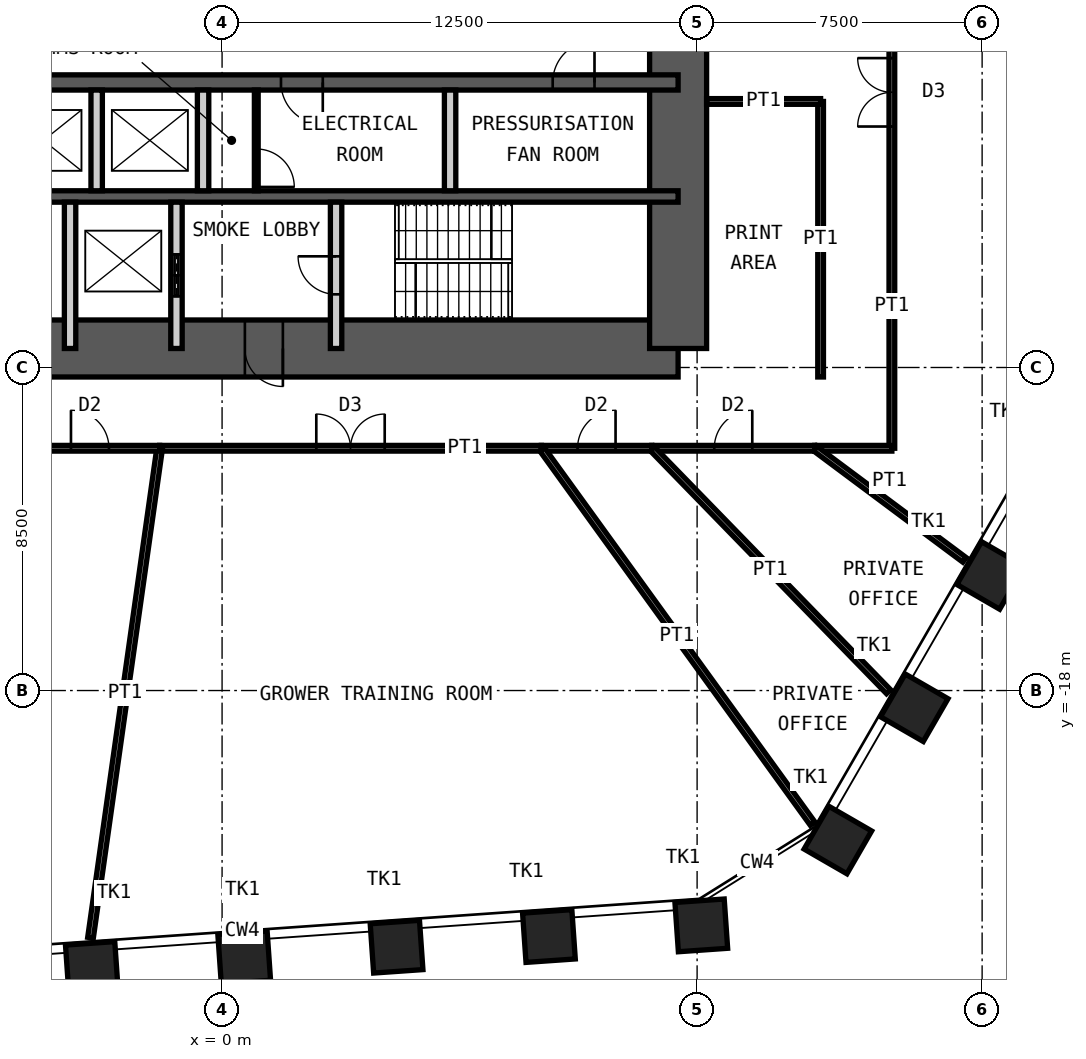
"""IFC4 building model, lengths in metres.
Left out: names, types, materials, properties, quantities, classifications, styles, units other than length and angle.
Written with IfcOpenShell. Run it as: python <this file> out.ifc"""

import sys

from ifc_helpers import new_model, si_unit, direction, frame, frame_2d, origin, origin_2d, place, context, subcontext, project, spatial, rectangle, hollow_rectangle, extrude, element, fill, save


model = new_model("IFC4")
c1 = context("Model", 3, precision=1e-05, world=origin(), true_north=direction((0.0, 1.0)))
c2 = subcontext(c1, "Body", "Model", "MODEL_VIEW")
j1 = project(units=[si_unit("LENGTHUNIT", "METRE"), si_unit("PLANEANGLEUNIT", "RADIAN")], contexts=[c1])
p1 = place(None, origin())
s1 = spatial("IfcSite", under=j1, at=p1, CompositionType="ELEMENT")
p2 = place(p1, origin())
s2 = spatial("IfcBuilding", under=s1, at=p2, CompositionType="ELEMENT")
p3 = place(p2, frame((0.0, 0.0, 170.2)))
s3 = spatial("IfcBuildingStorey", under=s2, at=p3, CompositionType="ELEMENT", Elevation=170.2)
for number, where, z_axis, x_axis in (
    (1, (20.223, -14.972, 0.0), (0.0, 0.0, 1.0), (0.5, 0.866, 0.0)),
    (2, (18.214, -18.453, 0.0), (0.0, 0.0, 1.0), (0.5, 0.866, 0.0)),
    (3, (16.204, -21.933, 0.0), (0.0, 0.0, 1.0), (0.5, 0.866, 0.0)),
    (4, (12.61, -24.179, 0.0), (0.0, 0.0, 1.0), (0.998, 0.07, 0.0)),
    (5, (8.601, -24.46, 0.0), (0.0, 0.0, 1.0), (0.998, 0.07, 0.0)),
    (6, (4.592, -24.74, 0.0), (0.0, 0.0, 1.0), (0.998, 0.07, 0.0)),
    (7, (0.582, -25.02, 0.0), (0.0, 0.0, 1.0), (0.998, 0.07, 0.0)),
    (8, (-3.427, -25.301, 0.0), (0.0, 0.0, 1.0), (0.998, 0.07, 0.0)),
):
    element("IfcColumn", number, at=place(p3, frame(where, z_axis=z_axis, x_axis=x_axis)), inside=s3, PredefinedType="COLUMN", context=c2, shape_type="SweptSolid", body=[
        extrude(hollow_rectangle(XDim=1.3, YDim=1.3, WallThickness=0.1, at=origin_2d()), origin(), (0.0, 0.0, 1.0), 4.2),
    ])
p4 = place(p3, frame((-12.0, -9.0, 0.0), z_axis=(0.0, 0.0, 1.0), x_axis=(1.0, 0.0, 0.0)))
e9 = element("IfcWall", 9, at=p4, inside=s3, PredefinedType="SHEAR", context=c2, shape_type="SweptSolid", body=[
    extrude(rectangle(XDim=24.0, YDim=1.5, at=frame_2d((12.0, 0.0))), origin(), (0.0, 0.0, 1.0), 4.2),
])
p5 = place(p4, frame((1.35, 0.0, 0.0)))
e10 = element("IfcOpeningElement", 10, at=p5, cuts=e9, PredefinedType="OPENING", context=c2, shape_type="SweptSolid", body=[
    extrude(rectangle(XDim=1.0, YDim=2.1, at=frame_2d((0.5, 1.05))), frame((0.0, 0.76, 0.0), z_axis=(0.0, -1.0, 0.0), x_axis=(1.0, 0.0, 0.0)), (0.0, 0.0, 1.0), 1.52),
])
p6 = place(p4, frame((5.325, 0.0, 0.0)))
e11 = element("IfcOpeningElement", 11, at=p6, cuts=e9, PredefinedType="OPENING", context=c2, shape_type="SweptSolid", body=[
    extrude(rectangle(XDim=1.15, YDim=2.1, at=frame_2d((0.575, 1.05))), frame((0.0, 0.76, 0.0), z_axis=(0.0, -1.0, 0.0), x_axis=(1.0, 0.0, 0.0)), (0.0, 0.0, 1.0), 1.52),
])
p7 = place(p4, frame((12.6, 0.0, 0.0)))
e12 = element("IfcOpeningElement", 12, at=p7, cuts=e9, PredefinedType="OPENING", context=c2, shape_type="SweptSolid", body=[
    extrude(rectangle(XDim=1.0, YDim=2.1, at=frame_2d((0.5, 1.05))), frame((0.0, 0.76, 0.0), z_axis=(0.0, -1.0, 0.0), x_axis=(1.0, 0.0, 0.0)), (0.0, 0.0, 1.0), 1.52),
])
p8 = place(p3, frame((12.0, -9.0, 0.0), z_axis=(0.0, 0.0, 1.0), x_axis=(0.0, 1.0, 0.0)))
e13 = element("IfcWall", 13, at=p8, inside=s3, PredefinedType="SHEAR", context=c2, shape_type="SweptSolid", body=[
    extrude(rectangle(XDim=18.0, YDim=1.5, at=frame_2d((9.0, 0.0))), origin(), (0.0, 0.0, 1.0), 4.2),
])
p9 = place(p8, frame((8.1, 0.0, 0.0)))
e14 = element("IfcOpeningElement", 14, at=p9, cuts=e13, PredefinedType="OPENING", context=c2, shape_type="SweptSolid", body=[
    extrude(rectangle(XDim=1.8, YDim=2.1, at=frame_2d((0.9, 1.05))), frame((0.0, 0.76, 0.0), z_axis=(0.0, -1.0, 0.0), x_axis=(1.0, 0.0, 0.0)), (0.0, 0.0, 1.0), 1.52),
])
p10 = place(p3, frame((-12.0, -2.0, 0.0), z_axis=(0.0, 0.0, 1.0), x_axis=(1.0, 0.0, 0.0)))
e15 = element("IfcWall", 15, at=p10, inside=s3, PredefinedType="SHEAR", context=c2, shape_type="SweptSolid", body=[
    extrude(rectangle(XDim=24.0, YDim=0.4, at=frame_2d((12.0, 0.0))), origin(), (0.0, 0.0, 1.0), 4.2),
])
p11 = place(p10, frame((1.1, 0.0, 0.0)))
e16 = element("IfcOpeningElement", 16, at=p11, cuts=e15, PredefinedType="OPENING", context=c2, shape_type="SweptSolid", body=[
    extrude(rectangle(XDim=1.1, YDim=2.1, at=frame_2d((0.55, 1.05))), frame((0.0, 0.21, 0.0), z_axis=(0.0, -1.0, 0.0), x_axis=(1.0, 0.0, 0.0)), (0.0, 0.0, 1.0), 0.42),
])
p12 = place(p10, frame((13.55, 0.0, 0.0)))
e17 = element("IfcOpeningElement", 17, at=p12, cuts=e15, PredefinedType="OPENING", context=c2, shape_type="SweptSolid", body=[
    extrude(rectangle(XDim=1.1, YDim=2.1, at=frame_2d((0.55, 1.05))), frame((0.0, 0.21, 0.0), z_axis=(0.0, -1.0, 0.0), x_axis=(1.0, 0.0, 0.0)), (0.0, 0.0, 1.0), 0.42),
])
p13 = place(p10, frame((20.7, 0.0, 0.0)))
e18 = element("IfcOpeningElement", 18, at=p13, cuts=e15, PredefinedType="OPENING", context=c2, shape_type="SweptSolid", body=[
    extrude(rectangle(XDim=1.1, YDim=2.1, at=frame_2d((0.55, 1.05))), frame((0.0, 0.21, 0.0), z_axis=(0.0, -1.0, 0.0), x_axis=(1.0, 0.0, 0.0)), (0.0, 0.0, 1.0), 0.42),
])
p14 = place(p10, frame((4.0, 0.0, 0.0)))
e19 = element("IfcOpeningElement", 19, at=p14, cuts=e15, PredefinedType="OPENING", context=c2, shape_type="SweptSolid", body=[
    extrude(rectangle(XDim=1.0, YDim=2.1, at=frame_2d((0.5, 1.05))), frame((0.0, 0.21, 0.0), z_axis=(0.0, -1.0, 0.0), x_axis=(1.0, 0.0, 0.0)), (0.0, 0.0, 1.0), 0.42),
])
p15 = place(p3, frame((-12.0, -5.0, 0.0), z_axis=(0.0, 0.0, 1.0), x_axis=(1.0, 0.0, 0.0)))
e20 = element("IfcWall", 20, at=p15, inside=s3, PredefinedType="SHEAR", context=c2, shape_type="SweptSolid", body=[
    extrude(rectangle(XDim=24.0, YDim=0.3, at=frame_2d((12.0, 0.0))), origin(), (0.0, 0.0, 1.0), 4.2),
])
for number, where, z_axis, x_axis in (
    (21, (-3.3, -4.85, 0.0), (0.0, 0.0, 1.0), (0.0, 1.0, 0.0)),
    (22, (-0.5, -4.85, 0.0), (0.0, 0.0, 1.0), (0.0, 1.0, 0.0)),
    (23, (6.0, -4.85, 0.0), (0.0, 0.0, 1.0), (0.0, 1.0, 0.0)),
):
    element("IfcWall", number, at=place(p3, frame(where, z_axis=z_axis, x_axis=x_axis)), inside=s3, PredefinedType="PARTITIONING", context=c2, shape_type="SweptSolid", body=[
        extrude(rectangle(XDim=2.65, YDim=0.3, at=frame_2d((1.325, 0.0))), origin(), (0.0, 0.0, 1.0), 3.98),
    ])
p16 = place(p3, frame((-4.0, -9.0, 0.0), z_axis=(0.0, 0.0, 1.0), x_axis=(0.0, 1.0, 0.0)))
e24 = element("IfcWall", 24, at=p16, inside=s3, PredefinedType="PARTITIONING", context=c2, shape_type="SweptSolid", body=[
    extrude(rectangle(XDim=3.85, YDim=0.3, at=frame_2d((1.925, 0.0))), origin(), (0.0, 0.0, 1.0), 3.98),
])
p17 = place(p3, frame((-1.2, -9.0, 0.0), z_axis=(0.0, 0.0, 1.0), x_axis=(0.0, 1.0, 0.0)))
e25 = element("IfcWall", 25, at=p17, inside=s3, PredefinedType="PARTITIONING", context=c2, shape_type="SweptSolid", body=[
    extrude(rectangle(XDim=3.85, YDim=0.3, at=frame_2d((1.925, 0.0))), origin(), (0.0, 0.0, 1.0), 3.98),
])
p18 = place(p17, frame((1.375, 0.0, 0.0)))
e26 = element("IfcOpeningElement", 26, at=p18, cuts=e25, PredefinedType="OPENING", context=c2, shape_type="SweptSolid", body=[
    extrude(rectangle(XDim=1.1, YDim=2.4, at=frame_2d((0.55, 1.2))), frame((0.0, 0.16, 0.0), z_axis=(0.0, -1.0, 0.0), x_axis=(1.0, 0.0, 0.0)), (0.0, 0.0, 1.0), 0.32),
])
p19 = place(p3, frame((3.0, -9.0, 0.0), z_axis=(0.0, 0.0, 1.0), x_axis=(0.0, 1.0, 0.0)))
e27 = element("IfcWall", 27, at=p19, inside=s3, PredefinedType="PARTITIONING", context=c2, shape_type="SweptSolid", body=[
    extrude(rectangle(XDim=3.85, YDim=0.3, at=frame_2d((1.925, 0.0))), origin(), (0.0, 0.0, 1.0), 3.98),
])
p20 = place(p19, frame((1.425, 0.0, 0.0)))
e28 = element("IfcOpeningElement", 28, at=p20, cuts=e27, PredefinedType="OPENING", context=c2, shape_type="SweptSolid", body=[
    extrude(rectangle(XDim=1.0, YDim=2.1, at=frame_2d((0.5, 1.05))), frame((0.0, 0.16, 0.0), z_axis=(0.0, -1.0, 0.0), x_axis=(1.0, 0.0, 0.0)), (0.0, 0.0, 1.0), 0.32),
])
p21 = place(p3, frame((0.9, -4.85, 0.0), z_axis=(0.0, 0.0, 1.0), x_axis=(0.0, 1.0, 0.0)))
e29 = element("IfcWall", 29, at=p21, inside=s3, PredefinedType="PARTITIONING", context=c2, shape_type="SweptSolid", body=[
    extrude(rectangle(XDim=2.65, YDim=0.1, at=frame_2d((1.325, 0.0))), origin(), (0.0, 0.0, 1.0), 3.98),
])
p22 = place(p21, frame((0.1, 0.0, 0.0)))
e30 = element("IfcOpeningElement", 30, at=p22, cuts=e29, PredefinedType="OPENING", context=c2, shape_type="SweptSolid", body=[
    extrude(rectangle(XDim=1.0, YDim=2.4, at=frame_2d((0.5, 1.2))), frame((0.0, 0.06, 0.0), z_axis=(0.0, -1.0, 0.0), x_axis=(1.0, 0.0, 0.0)), (0.0, 0.0, 1.0), 0.12),
])
p23 = place(p3, frame((17.625, 7.106, 0.0), z_axis=(0.0, 0.0, 1.0), x_axis=(0.0, -1.0, 0.0)))
e31 = element("IfcWall", 31, at=p23, inside=s3, PredefinedType="PARTITIONING", context=c2, shape_type="SweptSolid", body=[
    extrude(rectangle(XDim=18.731, YDim=0.15, at=frame_2d((9.365, 0.0))), origin(), (0.0, 0.0, 1.0), 3.92),
])
p24 = place(p23, frame((8.466, 0.0, 0.0)))
e32 = element("IfcOpeningElement", 32, at=p24, cuts=e31, PredefinedType="OPENING", context=c2, shape_type="SweptSolid", body=[
    extrude(rectangle(XDim=1.8, YDim=2.4, at=frame_2d((0.9, 1.2))), frame((0.0, 0.085, 0.0), z_axis=(0.0, -1.0, 0.0), x_axis=(1.0, 0.0, 0.0)), (0.0, 0.0, 1.0), 0.17),
])
p25 = place(p3, frame((17.625, -11.625, 0.0), z_axis=(0.0, 0.0, 1.0), x_axis=(-1.0, 0.0, 0.0)))
e33 = element("IfcWall", 33, at=p25, inside=s3, PredefinedType="PARTITIONING", context=c2, shape_type="SweptSolid", body=[
    extrude(rectangle(XDim=2.029, YDim=0.15, at=frame_2d((1.014, 0.0))), origin(), (0.0, 0.0, 1.0), 3.92),
])
p26 = place(p3, frame((19.537, -14.562, 0.0), z_axis=(0.0, 0.0, 1.0), x_axis=(-0.801778753003, 0.597620976233, 0.0)))
e34 = element("IfcWall", 34, at=p26, inside=s3, PredefinedType="PARTITIONING", context=c2, shape_type="SweptSolid", body=[
    extrude(rectangle(XDim=4.915, YDim=0.15, at=frame_2d((2.458, 0.0))), origin(), (0.0, 0.0, 1.0), 2.72),
])
p27 = place(p3, frame((15.596, -11.625, 0.0), z_axis=(0.0, 0.0, 1.0), x_axis=(-1.0, 0.0, 0.0)))
e35 = element("IfcWall", 35, at=p27, inside=s3, PredefinedType="PARTITIONING", context=c2, shape_type="SweptSolid", body=[
    extrude(rectangle(XDim=4.289, YDim=0.15, at=frame_2d((2.145, 0.0))), origin(), (0.0, 0.0, 1.0), 3.92),
])
p28 = place(p27, frame((1.645, 0.0, 0.0)))
e36 = element("IfcOpeningElement", 36, at=p28, cuts=e35, PredefinedType="OPENING", context=c2, shape_type="SweptSolid", body=[
    extrude(rectangle(XDim=1.0, YDim=2.4, at=frame_2d((0.5, 1.2))), frame((0.0, 0.085, 0.0), z_axis=(0.0, -1.0, 0.0), x_axis=(1.0, 0.0, 0.0)), (0.0, 0.0, 1.0), 0.17),
])
p29 = place(p3, frame((17.538, -18.031, 0.0), z_axis=(0.0, 0.0, 1.0), x_axis=(-0.697230918085, 0.716846599257, 0.0)))
e37 = element("IfcWall", 37, at=p29, inside=s3, PredefinedType="PARTITIONING", context=c2, shape_type="SweptSolid", body=[
    extrude(rectangle(XDim=8.936, YDim=0.15, at=frame_2d((4.468, 0.0))), origin(), (0.0, 0.0, 1.0), 2.72),
])
p30 = place(p3, frame((11.307, -11.625, 0.0), z_axis=(0.0, 0.0, 1.0), x_axis=(-1.0, 0.0, 0.0)))
e38 = element("IfcWall", 38, at=p30, inside=s3, PredefinedType="PARTITIONING", context=c2, shape_type="SweptSolid", body=[
    extrude(rectangle(XDim=2.906, YDim=0.15, at=frame_2d((1.453, 0.0))), origin(), (0.0, 0.0, 1.0), 3.92),
])
p31 = place(p30, frame((0.953, 0.0, 0.0)))
e39 = element("IfcOpeningElement", 39, at=p31, cuts=e38, PredefinedType="OPENING", context=c2, shape_type="SweptSolid", body=[
    extrude(rectangle(XDim=1.0, YDim=2.4, at=frame_2d((0.5, 1.2))), frame((0.0, 0.085, 0.0), z_axis=(0.0, -1.0, 0.0), x_axis=(1.0, 0.0, 0.0)), (0.0, 0.0, 1.0), 0.17),
])
p32 = place(p3, frame((15.54, -21.502, 0.0), z_axis=(0.0, 0.0, 1.0), x_axis=(-0.585731902034, 0.810504866697, 0.0)))
e40 = element("IfcWall", 40, at=p32, inside=s3, PredefinedType="PARTITIONING", context=c2, shape_type="SweptSolid", body=[
    extrude(rectangle(XDim=12.187, YDim=0.15, at=frame_2d((6.093, 0.0))), origin(), (0.0, 0.0, 1.0), 2.72),
])
p33 = place(p3, frame((8.401, -11.625, 0.0), z_axis=(0.0, 0.0, 1.0), x_axis=(-1.0, 0.0, 0.0)))
e41 = element("IfcWall", 41, at=p33, inside=s3, PredefinedType="PARTITIONING", context=c2, shape_type="SweptSolid", body=[
    extrude(rectangle(XDim=10.044, YDim=0.15, at=frame_2d((5.022, 0.0))), origin(), (0.0, 0.0, 1.0), 3.92),
])
p34 = place(p33, frame((4.122, 0.0, 0.0)))
e42 = element("IfcOpeningElement", 42, at=p34, cuts=e41, PredefinedType="OPENING", context=c2, shape_type="SweptSolid", body=[
    extrude(rectangle(XDim=1.8, YDim=2.4, at=frame_2d((0.9, 1.2))), frame((0.0, 0.085, 0.0), z_axis=(0.0, -1.0, 0.0), x_axis=(1.0, 0.0, 0.0)), (0.0, 0.0, 1.0), 0.17),
])
p35 = place(p3, frame((-3.462, -24.503, 0.0), z_axis=(0.0, 0.0, 1.0), x_axis=(0.139899618934, 0.990165691499, 0.0)))
e43 = element("IfcWall", 43, at=p35, inside=s3, PredefinedType="PARTITIONING", context=c2, shape_type="SweptSolid", body=[
    extrude(rectangle(XDim=13.006, YDim=0.15, at=frame_2d((6.503, 0.0))), origin(), (0.0, 0.0, 1.0), 2.72),
])
p36 = place(p3, frame((-1.642, -11.625, 0.0), z_axis=(0.0, 0.0, 1.0), x_axis=(-1.0, 0.0, 0.0)))
e44 = element("IfcWall", 44, at=p36, inside=s3, PredefinedType="PARTITIONING", context=c2, shape_type="SweptSolid", body=[
    extrude(rectangle(XDim=3.668, YDim=0.15, at=frame_2d((1.834, 0.0))), origin(), (0.0, 0.0, 1.0), 3.92),
])
p37 = place(p36, frame((1.334, 0.0, 0.0)))
e45 = element("IfcOpeningElement", 45, at=p37, cuts=e44, PredefinedType="OPENING", context=c2, shape_type="SweptSolid", body=[
    extrude(rectangle(XDim=1.0, YDim=2.4, at=frame_2d((0.5, 1.2))), frame((0.0, 0.085, 0.0), z_axis=(0.0, -1.0, 0.0), x_axis=(1.0, 0.0, 0.0)), (0.0, 0.0, 1.0), 0.17),
])
p38 = place(p3, frame((15.75, -9.75, 0.0), z_axis=(0.0, 0.0, 1.0), x_axis=(0.0, 1.0, 0.0)))
e46 = element("IfcWall", 46, at=p38, inside=s3, PredefinedType="PARTITIONING", context=c2, shape_type="SweptSolid", body=[
    extrude(rectangle(XDim=7.25, YDim=0.15, at=frame_2d((3.625, 0.0))), origin(), (0.0, 0.0, 1.0), 3.92),
])
p39 = place(p3, frame((12.75, -2.5, 0.0), z_axis=(0.0, 0.0, 1.0), x_axis=(1.0, 0.0, 0.0)))
e47 = element("IfcWall", 47, at=p39, inside=s3, PredefinedType="PARTITIONING", context=c2, shape_type="SweptSolid", body=[
    extrude(rectangle(XDim=3.0, YDim=0.15, at=frame_2d((1.5, 0.0))), origin(), (0.0, 0.0, 1.0), 2.72),
])
p40 = place(p7, origin())
e48 = element("IfcDoor", 48, at=p40, inside=s3, OperationType="SINGLE_SWING_RIGHT", PredefinedType="DOOR", context=c2, shape_type="SweptSolid", body=[
    extrude(rectangle(XDim=1.0, YDim=2.1, at=frame_2d((0.5, 1.05))), frame((0.0, 0.025, 0.0), z_axis=(0.0, -1.0, 0.0), x_axis=(1.0, 0.0, 0.0)), (0.0, 0.0, 1.0), 0.05),
])
fill(e12, e48)
p41 = place(p20, origin())
e49 = element("IfcDoor", 49, at=p41, inside=s3, OperationType="SINGLE_SWING_LEFT", PredefinedType="DOOR", context=c2, shape_type="SweptSolid", body=[
    extrude(rectangle(XDim=1.0, YDim=2.1, at=frame_2d((0.5, 1.05))), frame((0.0, 0.025, 0.0), z_axis=(0.0, -1.0, 0.0), x_axis=(1.0, 0.0, 0.0)), (0.0, 0.0, 1.0), 0.05),
])
fill(e28, e49)
p42 = place(p12, origin())
e50 = element("IfcDoor", 50, at=p42, inside=s3, OperationType="SINGLE_SWING_RIGHT", PredefinedType="DOOR", context=c2, shape_type="SweptSolid", body=[
    extrude(rectangle(XDim=1.1, YDim=2.1, at=frame_2d((0.55, 1.05))), frame((0.0, 0.025, 0.0), z_axis=(0.0, -1.0, 0.0), x_axis=(1.0, 0.0, 0.0)), (0.0, 0.0, 1.0), 0.05),
])
fill(e17, e50)
p43 = place(p13, origin())
e51 = element("IfcDoor", 51, at=p43, inside=s3, OperationType="SINGLE_SWING_LEFT", PredefinedType="DOOR", context=c2, shape_type="SweptSolid", body=[
    extrude(rectangle(XDim=1.1, YDim=2.1, at=frame_2d((0.55, 1.05))), frame((0.0, 0.025, 0.0), z_axis=(0.0, -1.0, 0.0), x_axis=(1.0, 0.0, 0.0)), (0.0, 0.0, 1.0), 0.05),
])
fill(e18, e51)
p44 = place(p18, origin())
e52 = element("IfcDoor", 52, at=p44, inside=s3, OperationType="DOUBLE_DOOR_SLIDING", PredefinedType="DOOR", context=c2, shape_type="SweptSolid", body=[
    extrude(rectangle(XDim=1.1, YDim=2.4, at=frame_2d((0.55, 1.2))), frame((0.0, 0.025, 0.0), z_axis=(0.0, -1.0, 0.0), x_axis=(1.0, 0.0, 0.0)), (0.0, 0.0, 1.0), 0.05),
])
fill(e26, e52)
p45 = place(p22, origin())
e53 = element("IfcDoor", 53, at=p45, inside=s3, OperationType="SINGLE_SWING_LEFT", PredefinedType="DOOR", context=c2, shape_type="SweptSolid", body=[
    extrude(rectangle(XDim=1.0, YDim=2.4, at=frame_2d((0.5, 1.2))), frame((0.0, 0.025, 0.0), z_axis=(0.0, -1.0, 0.0), x_axis=(1.0, 0.0, 0.0)), (0.0, 0.0, 1.0), 0.05),
])
fill(e30, e53)
p46 = place(p24, origin())
e54 = element("IfcDoor", 54, at=p46, inside=s3, OperationType="DOUBLE_DOOR_DOUBLE_SWING", PredefinedType="DOOR", context=c2, shape_type="SweptSolid", body=[
    extrude(rectangle(XDim=1.8, YDim=2.4, at=frame_2d((0.9, 1.2))), frame((0.0, 0.025, 0.0), z_axis=(0.0, -1.0, 0.0), x_axis=(1.0, 0.0, 0.0)), (0.0, 0.0, 1.0), 0.05),
])
fill(e32, e54)
p47 = place(p28, origin())
e55 = element("IfcDoor", 55, at=p47, inside=s3, OperationType="SINGLE_SWING_LEFT", PredefinedType="DOOR", context=c2, shape_type="SweptSolid", body=[
    extrude(rectangle(XDim=1.0, YDim=2.4, at=frame_2d((0.5, 1.2))), frame((0.0, 0.025, 0.0), z_axis=(0.0, -1.0, 0.0), x_axis=(1.0, 0.0, 0.0)), (0.0, 0.0, 1.0), 0.05),
])
fill(e36, e55)
p48 = place(p31, origin())
e56 = element("IfcDoor", 56, at=p48, inside=s3, OperationType="SINGLE_SWING_LEFT", PredefinedType="DOOR", context=c2, shape_type="SweptSolid", body=[
    extrude(rectangle(XDim=1.0, YDim=2.4, at=frame_2d((0.5, 1.2))), frame((0.0, 0.025, 0.0), z_axis=(0.0, -1.0, 0.0), x_axis=(1.0, 0.0, 0.0)), (0.0, 0.0, 1.0), 0.05),
])
fill(e39, e56)
p49 = place(p34, origin())
e57 = element("IfcDoor", 57, at=p49, inside=s3, OperationType="DOUBLE_DOOR_DOUBLE_SWING", PredefinedType="DOOR", context=c2, shape_type="SweptSolid", body=[
    extrude(rectangle(XDim=1.8, YDim=2.4, at=frame_2d((0.9, 1.2))), frame((0.0, 0.025, 0.0), z_axis=(0.0, -1.0, 0.0), x_axis=(1.0, 0.0, 0.0)), (0.0, 0.0, 1.0), 0.05),
])
fill(e42, e57)
p50 = place(p37, origin())
e58 = element("IfcDoor", 58, at=p50, inside=s3, OperationType="SINGLE_SWING_RIGHT", PredefinedType="DOOR", context=c2, shape_type="SweptSolid", body=[
    extrude(rectangle(XDim=1.0, YDim=2.4, at=frame_2d((0.5, 1.2))), frame((0.0, 0.025, 0.0), z_axis=(0.0, -1.0, 0.0), x_axis=(1.0, 0.0, 0.0)), (0.0, 0.0, 1.0), 0.05),
])
fill(e45, e58)
save(model, sys.argv[1])
